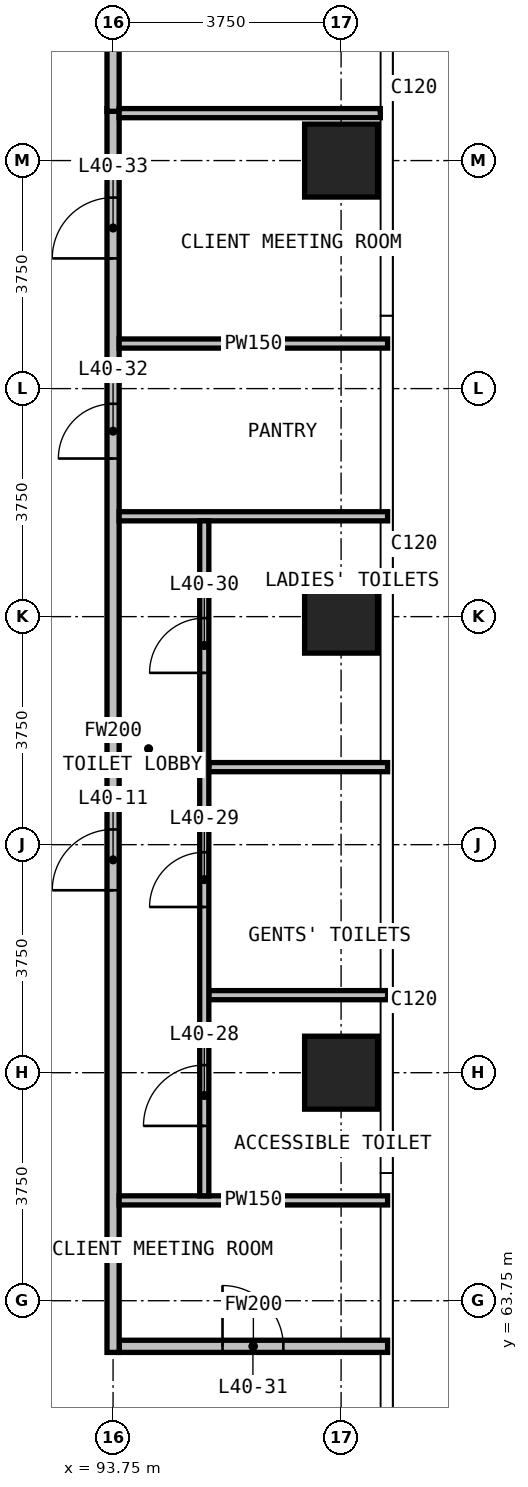
"""IFC4 building model, lengths in metres.
Left out: names, types, materials, properties, quantities, classifications, styles, units other than length and angle.
Written with IfcOpenShell. Run it as: python <this file> out.ifc"""

import sys

from ifc_helpers import new_model, si_unit, direction, frame, frame_2d, origin, origin_2d, place, context, subcontext, project, spatial, rectangle, extrude, element, fill, save


model = new_model("IFC4")
c1 = context("Model", 3, precision=1e-05, world=origin(), true_north=direction((0.0, 1.0)))
c2 = subcontext(c1, "Body", "Model", "MODEL_VIEW")
j1 = project(units=[si_unit("LENGTHUNIT", "METRE"), si_unit("PLANEANGLEUNIT", "RADIAN")], contexts=[c1])
p1 = place(None, origin())
s1 = spatial("IfcSite", under=j1, at=p1, CompositionType="ELEMENT")
p2 = place(p1, origin())
s2 = spatial("IfcBuilding", under=s1, at=p2, CompositionType="ELEMENT")
p3 = place(p2, frame((0.0, 0.0, 158.5)))
s3 = spatial("IfcBuildingStorey", under=s2, at=p3, CompositionType="ELEMENT", Elevation=158.5)
for number, where, z_axis, x_axis in (
    (1, (97.5, 67.5, 0.0), (0.0, 0.0, 1.0), (1.0, 0.0, 0.0)),
    (2, (97.5, 75.0, 0.0), (0.0, 0.0, 1.0), (1.0, 0.0, 0.0)),
    (3, (97.5, 82.5, 0.0), (0.0, 0.0, 1.0), (1.0, 0.0, 0.0)),
):
    element("IfcColumn", number, at=place(p3, frame(where, z_axis=z_axis, x_axis=x_axis)), inside=s3, PredefinedType="COLUMN", context=c2, shape_type="SweptSolid", body=[
        extrude(rectangle(XDim=1.2, YDim=1.2, at=origin_2d()), origin(), (0.0, 0.0, 1.0), 3.6),
    ])
p4 = place(p3, frame((93.85, 63.0, 0.0), z_axis=(0.0, 0.0, 1.0), x_axis=(1.0, 0.0, 0.0)))
e4 = element("IfcWall", 4, at=p4, inside=s3, PredefinedType="PARTITIONING", context=c2, shape_type="SweptSolid", body=[
    extrude(rectangle(XDim=4.415, YDim=0.2, at=frame_2d((2.208, 0.0))), origin(), (0.0, 0.0, 1.0), 3.3),
])
p5 = place(p4, frame((1.7, 0.0, 0.0)))
e5 = element("IfcOpeningElement", 5, at=p5, cuts=e4, PredefinedType="OPENING", context=c2, shape_type="SweptSolid", body=[
    extrude(rectangle(XDim=1.0, YDim=2.2, at=frame_2d((0.5, 1.1))), frame((0.0, 0.11, 0.0), z_axis=(0.0, -1.0, 0.0), x_axis=(1.0, 0.0, 0.0)), (0.0, 0.0, 1.0), 0.22),
])
p6 = place(p3, frame((93.75, 62.9, 0.0), z_axis=(0.0, 0.0, 1.0), x_axis=(0.0, 1.0, 0.0)))
e6 = element("IfcWall", 6, at=p6, inside=s3, PredefinedType="PARTITIONING", context=c2, shape_type="SweptSolid", body=[
    extrude(rectangle(XDim=20.455, YDim=0.2, at=frame_2d((10.228, 0.0))), origin(), (0.0, 0.0, 1.0), 3.3),
])
p7 = place(p6, frame((7.6, 0.0, 0.0)))
e7 = element("IfcOpeningElement", 7, at=p7, cuts=e6, PredefinedType="OPENING", context=c2, shape_type="SweptSolid", body=[
    extrude(rectangle(XDim=1.0, YDim=2.2, at=frame_2d((0.5, 1.1))), frame((0.0, 0.11, 0.0), z_axis=(0.0, -1.0, 0.0), x_axis=(1.0, 0.0, 0.0)), (0.0, 0.0, 1.0), 0.22),
])
p8 = place(p6, frame((14.7, 0.0, 0.0)))
e8 = element("IfcOpeningElement", 8, at=p8, cuts=e6, PredefinedType="OPENING", context=c2, shape_type="SweptSolid", body=[
    extrude(rectangle(XDim=0.9, YDim=2.2, at=frame_2d((0.45, 1.1))), frame((0.0, 0.11, 0.0), z_axis=(0.0, -1.0, 0.0), x_axis=(1.0, 0.0, 0.0)), (0.0, 0.0, 1.0), 0.22),
])
p9 = place(p6, frame((17.991, 0.0, 0.0)))
e9 = element("IfcOpeningElement", 9, at=p9, cuts=e6, PredefinedType="OPENING", context=c2, shape_type="SweptSolid", body=[
    extrude(rectangle(XDim=1.0, YDim=2.2, at=frame_2d((0.5, 1.1))), frame((0.0, 0.11, 0.0), z_axis=(0.0, -1.0, 0.0), x_axis=(1.0, 0.0, 0.0)), (0.0, 0.0, 1.0), 0.22),
])
p10 = place(p3, frame((93.75, 83.31, 0.0), z_axis=(0.0, 0.0, 1.0), x_axis=(0.0, 1.0, 0.0)))
e10 = element("IfcWall", 10, at=p10, inside=s3, PredefinedType="PARTITIONING", context=c2, shape_type="SweptSolid", body=[
    extrude(rectangle(XDim=7.335, YDim=0.2, at=frame_2d((3.667, 0.0))), origin(), (0.0, 0.0, 1.0), 3.3),
])
p11 = place(p3, frame((93.85, 65.4, 0.0), z_axis=(0.0, 0.0, 1.0), x_axis=(1.0, 0.0, 0.0)))
e11 = element("IfcWall", 11, at=p11, inside=s3, PredefinedType="PARTITIONING", context=c2, shape_type="SweptSolid", body=[
    extrude(rectangle(XDim=4.415, YDim=0.15, at=frame_2d((2.208, 0.0))), origin(), (0.0, 0.0, 1.0), 3.3),
])
for number, where, z_axis, x_axis in (
    (12, (95.325, 68.775, 0.0), (0.0, 0.0, 1.0), (1.0, 0.0, 0.0)),
    (13, (95.325, 72.525, 0.0), (0.0, 0.0, 1.0), (1.0, 0.0, 0.0)),
):
    element("IfcWall", number, at=place(p3, frame(where, z_axis=z_axis, x_axis=x_axis)), inside=s3, PredefinedType="PARTITIONING", context=c2, shape_type="SweptSolid", body=[
        extrude(rectangle(XDim=2.94, YDim=0.15, at=frame_2d((1.47, 0.0))), origin(), (0.0, 0.0, 1.0), 3.3),
    ])
for number, where, z_axis, x_axis in (
    (14, (93.85, 76.65, 0.0), (0.0, 0.0, 1.0), (1.0, 0.0, 0.0)),
    (15, (93.85, 79.491, 0.0), (0.0, 0.0, 1.0), (1.0, 0.0, 0.0)),
):
    element("IfcWall", number, at=place(p3, frame(where, z_axis=z_axis, x_axis=x_axis)), inside=s3, PredefinedType="PARTITIONING", context=c2, shape_type="SweptSolid", body=[
        extrude(rectangle(XDim=4.415, YDim=0.15, at=frame_2d((2.208, 0.0))), origin(), (0.0, 0.0, 1.0), 3.3),
    ])
p12 = place(p3, frame((93.85, 83.28, 0.0), z_axis=(0.0, 0.0, 1.0), x_axis=(1.0, 0.0, 0.0)))
e16 = element("IfcWall", 16, at=p12, inside=s3, PredefinedType="PARTITIONING", context=c2, shape_type="SweptSolid", body=[
    extrude(rectangle(XDim=4.295, YDim=0.15, at=frame_2d((2.147, 0.0))), origin(), (0.0, 0.0, 1.0), 3.3),
])
p13 = place(p3, frame((95.25, 65.475, 0.0), z_axis=(0.0, 0.0, 1.0), x_axis=(0.0, 1.0, 0.0)))
e17 = element("IfcWall", 17, at=p13, inside=s3, PredefinedType="PARTITIONING", context=c2, shape_type="SweptSolid", body=[
    extrude(rectangle(XDim=11.1, YDim=0.15, at=frame_2d((5.55, 0.0))), origin(), (0.0, 0.0, 1.0), 3.3),
])
p14 = place(p13, frame((1.15, 0.0, 0.0)))
e18 = element("IfcOpeningElement", 18, at=p14, cuts=e17, PredefinedType="OPENING", context=c2, shape_type="SweptSolid", body=[
    extrude(rectangle(XDim=1.0, YDim=2.2, at=frame_2d((0.5, 1.1))), frame((0.0, 0.085, 0.0), z_axis=(0.0, -1.0, 0.0), x_axis=(1.0, 0.0, 0.0)), (0.0, 0.0, 1.0), 0.17),
])
p15 = place(p13, frame((4.75, 0.0, 0.0)))
e19 = element("IfcOpeningElement", 19, at=p15, cuts=e17, PredefinedType="OPENING", context=c2, shape_type="SweptSolid", body=[
    extrude(rectangle(XDim=0.9, YDim=2.2, at=frame_2d((0.45, 1.1))), frame((0.0, 0.085, 0.0), z_axis=(0.0, -1.0, 0.0), x_axis=(1.0, 0.0, 0.0)), (0.0, 0.0, 1.0), 0.17),
])
p16 = place(p13, frame((8.6, 0.0, 0.0)))
e20 = element("IfcOpeningElement", 20, at=p16, cuts=e17, PredefinedType="OPENING", context=c2, shape_type="SweptSolid", body=[
    extrude(rectangle(XDim=0.9, YDim=2.2, at=frame_2d((0.45, 1.1))), frame((0.0, 0.085, 0.0), z_axis=(0.0, -1.0, 0.0), x_axis=(1.0, 0.0, 0.0)), (0.0, 0.0, 1.0), 0.17),
])
p17 = place(p7, origin())
e21 = element("IfcDoor", 21, at=p17, inside=s3, OperationType="SINGLE_SWING_LEFT", PredefinedType="DOOR", context=c2, shape_type="SweptSolid", body=[
    extrude(rectangle(XDim=1.0, YDim=2.2, at=frame_2d((0.5, 1.1))), frame((0.0, 0.025, 0.0), z_axis=(0.0, -1.0, 0.0), x_axis=(1.0, 0.0, 0.0)), (0.0, 0.0, 1.0), 0.05),
])
fill(e7, e21)
p18 = place(p14, origin())
e22 = element("IfcDoor", 22, at=p18, inside=s3, OperationType="SINGLE_SWING_LEFT", PredefinedType="DOOR", context=c2, shape_type="SweptSolid", body=[
    extrude(rectangle(XDim=1.0, YDim=2.2, at=frame_2d((0.5, 1.1))), frame((0.0, 0.025, 0.0), z_axis=(0.0, -1.0, 0.0), x_axis=(1.0, 0.0, 0.0)), (0.0, 0.0, 1.0), 0.05),
])
fill(e18, e22)
p19 = place(p15, origin())
e23 = element("IfcDoor", 23, at=p19, inside=s3, OperationType="SINGLE_SWING_LEFT", PredefinedType="DOOR", context=c2, shape_type="SweptSolid", body=[
    extrude(rectangle(XDim=0.9, YDim=2.2, at=frame_2d((0.45, 1.1))), frame((0.0, 0.025, 0.0), z_axis=(0.0, -1.0, 0.0), x_axis=(1.0, 0.0, 0.0)), (0.0, 0.0, 1.0), 0.05),
])
fill(e19, e23)
p20 = place(p16, origin())
e24 = element("IfcDoor", 24, at=p20, inside=s3, OperationType="SINGLE_SWING_LEFT", PredefinedType="DOOR", context=c2, shape_type="SweptSolid", body=[
    extrude(rectangle(XDim=0.9, YDim=2.2, at=frame_2d((0.45, 1.1))), frame((0.0, 0.025, 0.0), z_axis=(0.0, -1.0, 0.0), x_axis=(1.0, 0.0, 0.0)), (0.0, 0.0, 1.0), 0.05),
])
fill(e20, e24)
p21 = place(p5, origin())
e25 = element("IfcDoor", 25, at=p21, inside=s3, OperationType="SINGLE_SWING_LEFT", PredefinedType="DOOR", context=c2, shape_type="SweptSolid", body=[
    extrude(rectangle(XDim=1.0, YDim=2.2, at=frame_2d((0.5, 1.1))), frame((0.0, 0.025, 0.0), z_axis=(0.0, -1.0, 0.0), x_axis=(1.0, 0.0, 0.0)), (0.0, 0.0, 1.0), 0.05),
])
fill(e5, e25)
p22 = place(p8, origin())
e26 = element("IfcDoor", 26, at=p22, inside=s3, OperationType="SINGLE_SWING_LEFT", PredefinedType="DOOR", context=c2, shape_type="SweptSolid", body=[
    extrude(rectangle(XDim=0.9, YDim=2.2, at=frame_2d((0.45, 1.1))), frame((0.0, 0.025, 0.0), z_axis=(0.0, -1.0, 0.0), x_axis=(1.0, 0.0, 0.0)), (0.0, 0.0, 1.0), 0.05),
])
fill(e8, e26)
p23 = place(p9, origin())
e27 = element("IfcDoor", 27, at=p23, inside=s3, OperationType="SINGLE_SWING_LEFT", PredefinedType="DOOR", context=c2, shape_type="SweptSolid", body=[
    extrude(rectangle(XDim=1.0, YDim=2.2, at=frame_2d((0.5, 1.1))), frame((0.0, 0.025, 0.0), z_axis=(0.0, -1.0, 0.0), x_axis=(1.0, 0.0, 0.0)), (0.0, 0.0, 1.0), 0.05),
])
fill(e9, e27)
save(model, sys.argv[1])
